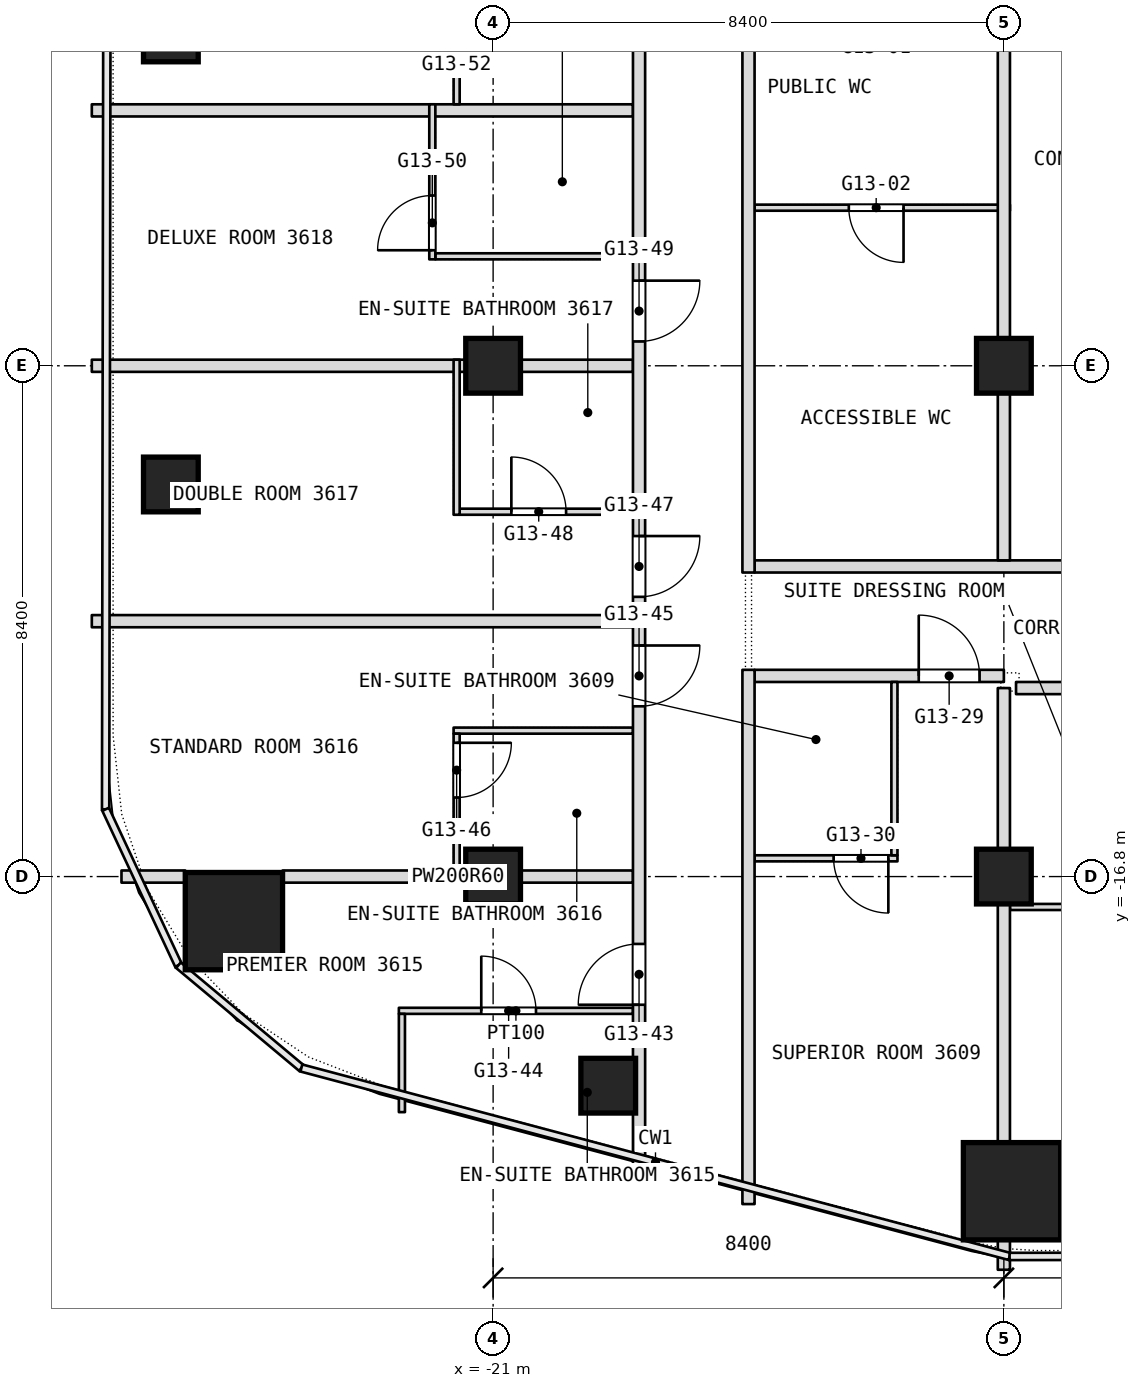
"""IFC4 building model, lengths in metres.
Left out: names, types, materials, properties, quantities, classifications, styles, units other than length and angle.
Written with IfcOpenShell. Run it as: python <this file> out.ifc"""

import sys

from ifc_helpers import new_model, si_unit, direction, frame, frame_2d, origin, origin_2d, place, context, subcontext, project, spatial, rectangle, extrude, element, fill, save


model = new_model("IFC4")
c1 = context("Model", 3, precision=1e-05, world=origin(), true_north=direction((0.0, 1.0)))
c2 = subcontext(c1, "Body", "Model", "MODEL_VIEW")
j1 = project(units=[si_unit("LENGTHUNIT", "METRE"), si_unit("PLANEANGLEUNIT", "RADIAN")], contexts=[c1])
p1 = place(None, origin())
s1 = spatial("IfcSite", under=j1, at=p1, CompositionType="ELEMENT")
p2 = place(p1, origin())
s2 = spatial("IfcBuilding", under=s1, at=p2, CompositionType="ELEMENT")
p3 = place(p2, frame((0.0, 0.0, 155.3)))
s3 = spatial("IfcBuildingStorey", under=s2, at=p3, CompositionType="ELEMENT", Elevation=155.3)
for number, where, z_axis, x_axis in (
    (1, (-25.263, -17.533, 0.0), (0.0, 0.0, 1.0), (1.0, 0.0, 0.0)),
    (2, (-12.466, -21.975, 0.0), (0.0, 0.0, 1.0), (1.0, 0.0, 0.0)),
):
    element("IfcColumn", number, at=place(p3, frame(where, z_axis=z_axis, x_axis=x_axis)), inside=s3, PredefinedType="COLUMN", context=c2, shape_type="SweptSolid", body=[
        extrude(rectangle(XDim=1.6, YDim=1.6, at=origin_2d()), origin(), (0.0, 0.0, 1.0), 3.6),
    ])
for number, where, z_axis, x_axis in (
    (3, (-21.0, -16.8, 0.0), (0.0, 0.0, 1.0), (1.0, 0.0, 0.0)),
    (4, (-21.0, -8.4, 0.0), (0.0, 0.0, 1.0), (1.0, 0.0, 0.0)),
    (5, (-12.6, -16.8, 0.0), (0.0, 0.0, 1.0), (1.0, 0.0, 0.0)),
    (6, (-12.6, -8.4, 0.0), (0.0, 0.0, 1.0), (1.0, 0.0, 0.0)),
    (7, (-26.3, -10.352, 0.0), (0.0, 0.0, 1.0), (1.0, 0.0, 0.0)),
    (8, (-26.3, -2.951, 0.0), (0.0, 0.0, 1.0), (1.0, 0.0, 0.0)),
    (9, (-19.107, -20.239, 0.0), (0.0, 0.0, 1.0), (1.0, 0.0, 0.0)),
):
    element("IfcColumn", number, at=place(p3, frame(where, z_axis=z_axis, x_axis=x_axis)), inside=s3, PredefinedType="COLUMN", context=c2, shape_type="SweptSolid", body=[
        extrude(rectangle(XDim=0.9, YDim=0.9, at=origin_2d()), origin(), (0.0, 0.0, 1.0), 3.6),
    ])
p4 = place(p3, frame((-22.55, -19.008, 0.0), z_axis=(0.0, 0.0, 1.0), x_axis=(1.0, 0.0, 0.0)))
e10 = element("IfcWall", 10, at=p4, inside=s3, PredefinedType="PARTITIONING", context=c2, shape_type="SweptSolid", body=[
    extrude(rectangle(XDim=3.85, YDim=0.1, at=frame_2d((1.925, 0.0))), origin(), (0.0, 0.0, 1.0), 3.34),
])
p5 = place(p4, frame((1.355, 0.0, 0.0)))
e11 = element("IfcOpeningElement", 11, at=p5, cuts=e10, PredefinedType="OPENING", context=c2, shape_type="SweptSolid", body=[
    extrude(rectangle(XDim=0.9, YDim=2.1, at=frame_2d((0.45, 1.05))), frame((0.0, 0.05, 0.0), z_axis=(0.0, -1.0, 0.0), x_axis=(1.0, 0.0, 0.0)), (0.0, 0.0, 1.0), 0.1),
])
p6 = place(p3, frame((-12.5, -17.3, 0.0), z_axis=(0.0, 0.0, 1.0), x_axis=(1.0, 0.0, 0.0)))
e12 = element("IfcWall", 12, at=p6, inside=s3, PredefinedType="PARTITIONING", context=c2, shape_type="SweptSolid", body=[
    extrude(rectangle(XDim=2.35, YDim=0.1, at=frame_2d((1.175, 0.0))), origin(), (0.0, 0.0, 1.0), 3.34),
])
p7 = place(p6, frame((1.3, 0.0, 0.0)))
e13 = element("IfcOpeningElement", 13, at=p7, cuts=e12, PredefinedType="OPENING", context=c2, shape_type="SweptSolid", body=[
    extrude(rectangle(XDim=0.9, YDim=2.1, at=frame_2d((0.45, 1.05))), frame((0.0, 0.05, 0.0), z_axis=(0.0, -1.0, 0.0), x_axis=(1.0, 0.0, 0.0)), (0.0, 0.0, 1.0), 0.1),
])
p8 = place(p3, frame((-27.112, -16.8, 0.0), z_axis=(0.0, 0.0, 1.0), x_axis=(1.0, 0.0, 0.0)))
e14 = element("IfcWall", 14, at=p8, inside=s3, PredefinedType="PARTITIONING", context=c2, shape_type="SweptSolid", body=[
    extrude(rectangle(XDim=1.049, YDim=0.2, at=frame_2d((0.524, 0.0))), origin(), (0.0, 0.0, 1.0), 3.34),
])
p9 = place(p3, frame((-24.463, -16.8, 0.0), z_axis=(0.0, 0.0, 1.0), x_axis=(1.0, 0.0, 0.0)))
e15 = element("IfcWall", 15, at=p9, inside=s3, PredefinedType="PARTITIONING", context=c2, shape_type="SweptSolid", body=[
    extrude(rectangle(XDim=5.763, YDim=0.2, at=frame_2d((2.881, 0.0))), origin(), (0.0, 0.0, 1.0), 2.89),
])
p10 = place(p3, frame((-16.7, -16.5, 0.0), z_axis=(0.0, 0.0, 1.0), x_axis=(1.0, 0.0, 0.0)))
e16 = element("IfcWall", 16, at=p10, inside=s3, PredefinedType="PARTITIONING", context=c2, shape_type="SweptSolid", body=[
    extrude(rectangle(XDim=2.35, YDim=0.1, at=frame_2d((1.175, 0.0))), origin(), (0.0, 0.0, 1.0), 3.34),
])
p11 = place(p10, frame((1.3, 0.0, 0.0)))
e17 = element("IfcOpeningElement", 17, at=p11, cuts=e16, PredefinedType="OPENING", context=c2, shape_type="SweptSolid", body=[
    extrude(rectangle(XDim=0.9, YDim=2.1, at=frame_2d((0.45, 1.05))), frame((0.0, 0.05, 0.0), z_axis=(0.0, -1.0, 0.0), x_axis=(1.0, 0.0, 0.0)), (0.0, 0.0, 1.0), 0.1),
])
p12 = place(p3, frame((-21.65, -14.4, 0.0), z_axis=(0.0, 0.0, 1.0), x_axis=(1.0, 0.0, 0.0)))
e18 = element("IfcWall", 18, at=p12, inside=s3, PredefinedType="PARTITIONING", context=c2, shape_type="SweptSolid", body=[
    extrude(rectangle(XDim=2.95, YDim=0.1, at=frame_2d((1.475, 0.0))), origin(), (0.0, 0.0, 1.0), 3.34),
])
p13 = place(p3, frame((-12.4, -13.7, 0.0), z_axis=(0.0, 0.0, 1.0), x_axis=(1.0, 0.0, 0.0)))
e19 = element("IfcWall", 19, at=p13, inside=s3, PredefinedType="PARTITIONING", context=c2, shape_type="SweptSolid", body=[
    extrude(rectangle(XDim=9.2, YDim=0.2, at=frame_2d((4.6, 0.0))), origin(), (0.0, 0.0, 1.0), 3.34),
])
p14 = place(p13, frame((3.4, 0.0, 0.0)))
e20 = element("IfcOpeningElement", 20, at=p14, cuts=e19, PredefinedType="OPENING", context=c2, shape_type="SweptSolid", body=[
    extrude(rectangle(XDim=1.1, YDim=2.1, at=frame_2d((0.55, 1.05))), frame((0.0, 0.1, 0.0), z_axis=(0.0, -1.0, 0.0), x_axis=(1.0, 0.0, 0.0)), (0.0, 0.0, 1.0), 0.2),
])
p15 = place(p3, frame((-16.7, -13.5, 0.0), z_axis=(0.0, 0.0, 1.0), x_axis=(1.0, 0.0, 0.0)))
e21 = element("IfcWall", 21, at=p15, inside=s3, PredefinedType="PARTITIONING", context=c2, shape_type="SweptSolid", body=[
    extrude(rectangle(XDim=4.1, YDim=0.2, at=frame_2d((2.05, 0.0))), origin(), (0.0, 0.0, 1.0), 3.34),
])
p16 = place(p15, frame((2.7, 0.0, 0.0)))
e22 = element("IfcOpeningElement", 22, at=p16, cuts=e21, PredefinedType="OPENING", context=c2, shape_type="SweptSolid", body=[
    extrude(rectangle(XDim=1.0, YDim=2.1, at=frame_2d((0.5, 1.05))), frame((0.0, 0.1, 0.0), z_axis=(0.0, -1.0, 0.0), x_axis=(1.0, 0.0, 0.0)), (0.0, 0.0, 1.0), 0.2),
])
p17 = place(p3, frame((-27.6, -12.6, 0.0), z_axis=(0.0, 0.0, 1.0), x_axis=(1.0, 0.0, 0.0)))
e23 = element("IfcWall", 23, at=p17, inside=s3, PredefinedType="PARTITIONING", context=c2, shape_type="SweptSolid", body=[
    extrude(rectangle(XDim=8.9, YDim=0.2, at=frame_2d((4.45, 0.0))), origin(), (0.0, 0.0, 1.0), 3.34),
])
p18 = place(p3, frame((-16.7, -11.7, 0.0), z_axis=(0.0, 0.0, 1.0), x_axis=(1.0, 0.0, 0.0)))
e24 = element("IfcWall", 24, at=p18, inside=s3, PredefinedType="PARTITIONING", context=c2, shape_type="SweptSolid", body=[
    extrude(rectangle(XDim=5.8, YDim=0.2, at=frame_2d((2.9, 0.0))), origin(), (0.0, 0.0, 1.0), 3.34),
])
p19 = place(p3, frame((-21.55, -10.8, 0.0), z_axis=(0.0, 0.0, 1.0), x_axis=(1.0, 0.0, 0.0)))
e25 = element("IfcWall", 25, at=p19, inside=s3, PredefinedType="PARTITIONING", context=c2, shape_type="SweptSolid", body=[
    extrude(rectangle(XDim=2.85, YDim=0.1, at=frame_2d((1.425, 0.0))), origin(), (0.0, 0.0, 1.0), 3.34),
])
p20 = place(p19, frame((0.85, 0.0, 0.0)))
e26 = element("IfcOpeningElement", 26, at=p20, cuts=e25, PredefinedType="OPENING", context=c2, shape_type="SweptSolid", body=[
    extrude(rectangle(XDim=0.9, YDim=2.1, at=frame_2d((0.45, 1.05))), frame((0.0, 0.05, 0.0), z_axis=(0.0, -1.0, 0.0), x_axis=(1.0, 0.0, 0.0)), (0.0, 0.0, 1.0), 0.1),
])
p21 = place(p3, frame((-27.6, -8.4, 0.0), z_axis=(0.0, 0.0, 1.0), x_axis=(1.0, 0.0, 0.0)))
e27 = element("IfcWall", 27, at=p21, inside=s3, PredefinedType="PARTITIONING", context=c2, shape_type="SweptSolid", body=[
    extrude(rectangle(XDim=8.9, YDim=0.2, at=frame_2d((4.45, 0.0))), origin(), (0.0, 0.0, 1.0), 2.89),
])
p22 = place(p3, frame((-21.95, -6.6, 0.0), z_axis=(0.0, 0.0, 1.0), x_axis=(1.0, 0.0, 0.0)))
e28 = element("IfcWall", 28, at=p22, inside=s3, PredefinedType="PARTITIONING", context=c2, shape_type="SweptSolid", body=[
    extrude(rectangle(XDim=3.25, YDim=0.1, at=frame_2d((1.625, 0.0))), origin(), (0.0, 0.0, 1.0), 3.34),
])
p23 = place(p3, frame((-16.7, -5.8, 0.0), z_axis=(0.0, 0.0, 1.0), x_axis=(1.0, 0.0, 0.0)))
e29 = element("IfcWall", 29, at=p23, inside=s3, PredefinedType="PARTITIONING", context=c2, shape_type="SweptSolid", body=[
    extrude(rectangle(XDim=4.2, YDim=0.1, at=frame_2d((2.1, 0.0))), origin(), (0.0, 0.0, 1.0), 3.34),
])
p24 = place(p23, frame((1.55, 0.0, 0.0)))
e30 = element("IfcOpeningElement", 30, at=p24, cuts=e29, PredefinedType="OPENING", context=c2, shape_type="SweptSolid", body=[
    extrude(rectangle(XDim=0.9, YDim=2.1, at=frame_2d((0.45, 1.05))), frame((0.0, 0.05, 0.0), z_axis=(0.0, -1.0, 0.0), x_axis=(1.0, 0.0, 0.0)), (0.0, 0.0, 1.0), 0.1),
])
p25 = place(p3, frame((-27.6, -4.2, 0.0), z_axis=(0.0, 0.0, 1.0), x_axis=(1.0, 0.0, 0.0)))
e31 = element("IfcWall", 31, at=p25, inside=s3, PredefinedType="PARTITIONING", context=c2, shape_type="SweptSolid", body=[
    extrude(rectangle(XDim=8.9, YDim=0.2, at=frame_2d((4.45, 0.0))), origin(), (0.0, 0.0, 1.0), 3.34),
])
p26 = place(p3, frame((-12.6, -23.266, 0.0), z_axis=(0.0, 0.0, 1.0), x_axis=(0.0, 1.0, 0.0)))
e32 = element("IfcWall", 32, at=p26, inside=s3, PredefinedType="PARTITIONING", context=c2, shape_type="SweptSolid", body=[
    extrude(rectangle(XDim=0.491, YDim=0.2, at=frame_2d((0.246, 0.0))), origin(), (0.0, 0.0, 1.0), 3.34),
])
p27 = place(p3, frame((-12.6, -21.175, 0.0), z_axis=(0.0, 0.0, 1.0), x_axis=(0.0, 1.0, 0.0)))
e33 = element("IfcWall", 33, at=p27, inside=s3, PredefinedType="PARTITIONING", context=c2, shape_type="SweptSolid", body=[
    extrude(rectangle(XDim=7.475, YDim=0.2, at=frame_2d((3.738, 0.0))), origin(), (0.0, 0.0, 1.0), 3.34),
])
p28 = place(p3, frame((-12.6, -11.6, 0.0), z_axis=(0.0, 0.0, 1.0), x_axis=(0.0, 1.0, 0.0)))
e34 = element("IfcWall", 34, at=p28, inside=s3, PredefinedType="PARTITIONING", context=c2, shape_type="SweptSolid", body=[
    extrude(rectangle(XDim=9.7, YDim=0.2, at=frame_2d((4.85, 0.0))), origin(), (0.0, 0.0, 1.0), 3.34),
])
p29 = place(p3, frame((-14.4, -16.45, 0.0), z_axis=(0.0, 0.0, 1.0), x_axis=(0.0, 1.0, 0.0)))
e35 = element("IfcWall", 35, at=p29, inside=s3, PredefinedType="PARTITIONING", context=c2, shape_type="SweptSolid", body=[
    extrude(rectangle(XDim=2.85, YDim=0.1, at=frame_2d((1.425, 0.0))), origin(), (0.0, 0.0, 1.0), 3.34),
])
p30 = place(p3, frame((-16.8, -22.186, 0.0), z_axis=(0.0, 0.0, 1.0), x_axis=(0.0, 1.0, 0.0)))
e36 = element("IfcWall", 36, at=p30, inside=s3, PredefinedType="PARTITIONING", context=c2, shape_type="SweptSolid", body=[
    extrude(rectangle(XDim=8.786, YDim=0.2, at=frame_2d((4.393, 0.0))), origin(), (0.0, 0.0, 1.0), 3.34),
])
p31 = place(p3, frame((-16.8, -11.8, 0.0), z_axis=(0.0, 0.0, 1.0), x_axis=(0.0, 1.0, 0.0)))
e37 = element("IfcWall", 37, at=p31, inside=s3, PredefinedType="PARTITIONING", context=c2, shape_type="SweptSolid", body=[
    extrude(rectangle(XDim=9.9, YDim=0.2, at=frame_2d((4.95, 0.0))), origin(), (0.0, 0.0, 1.0), 3.34),
])
p32 = place(p3, frame((-18.6, -21.708, 0.0), z_axis=(0.0, 0.0, 1.0), x_axis=(0.0, 1.0, 0.0)))
e38 = element("IfcWall", 38, at=p32, inside=s3, PredefinedType="PARTITIONING", context=c2, shape_type="SweptSolid", body=[
    extrude(rectangle(XDim=28.608, YDim=0.2, at=frame_2d((14.304, 0.0))), origin(), (0.0, 0.0, 1.0), 3.34),
])
p33 = place(p32, frame((2.8, 0.0, 0.0)))
e39 = element("IfcOpeningElement", 39, at=p33, cuts=e38, PredefinedType="OPENING", context=c2, shape_type="SweptSolid", body=[
    extrude(rectangle(XDim=1.0, YDim=2.1, at=frame_2d((0.5, 1.05))), frame((0.0, 0.1, 0.0), z_axis=(0.0, -1.0, 0.0), x_axis=(1.0, 0.0, 0.0)), (0.0, 0.0, 1.0), 0.2),
])
p34 = place(p32, frame((7.708, 0.0, 0.0)))
e40 = element("IfcOpeningElement", 40, at=p34, cuts=e38, PredefinedType="OPENING", context=c2, shape_type="SweptSolid", body=[
    extrude(rectangle(XDim=1.0, YDim=2.1, at=frame_2d((0.5, 1.05))), frame((0.0, 0.1, 0.0), z_axis=(0.0, -1.0, 0.0), x_axis=(1.0, 0.0, 0.0)), (0.0, 0.0, 1.0), 0.2),
])
p35 = place(p32, frame((9.508, 0.0, 0.0)))
e41 = element("IfcOpeningElement", 41, at=p35, cuts=e38, PredefinedType="OPENING", context=c2, shape_type="SweptSolid", body=[
    extrude(rectangle(XDim=1.0, YDim=2.1, at=frame_2d((0.5, 1.05))), frame((0.0, 0.1, 0.0), z_axis=(0.0, -1.0, 0.0), x_axis=(1.0, 0.0, 0.0)), (0.0, 0.0, 1.0), 0.2),
])
p36 = place(p32, frame((13.708, 0.0, 0.0)))
e42 = element("IfcOpeningElement", 42, at=p36, cuts=e38, PredefinedType="OPENING", context=c2, shape_type="SweptSolid", body=[
    extrude(rectangle(XDim=1.0, YDim=2.1, at=frame_2d((0.5, 1.05))), frame((0.0, 0.1, 0.0), z_axis=(0.0, -1.0, 0.0), x_axis=(1.0, 0.0, 0.0)), (0.0, 0.0, 1.0), 0.2),
])
p37 = place(p32, frame((20.308, 0.0, 0.0)))
e43 = element("IfcOpeningElement", 43, at=p37, cuts=e38, PredefinedType="OPENING", context=c2, shape_type="SweptSolid", body=[
    extrude(rectangle(XDim=1.0, YDim=2.1, at=frame_2d((0.5, 1.05))), frame((0.0, 0.1, 0.0), z_axis=(0.0, -1.0, 0.0), x_axis=(1.0, 0.0, 0.0)), (0.0, 0.0, 1.0), 0.2),
])
p38 = place(p3, frame((-21.6, -16.7, 0.0), z_axis=(0.0, 0.0, 1.0), x_axis=(0.0, 1.0, 0.0)))
e44 = element("IfcWall", 44, at=p38, inside=s3, PredefinedType="PARTITIONING", context=c2, shape_type="SweptSolid", body=[
    extrude(rectangle(XDim=2.25, YDim=0.1, at=frame_2d((1.125, 0.0))), origin(), (0.0, 0.0, 1.0), 3.34),
])
p39 = place(p38, frame((1.2, 0.0, 0.0)))
e45 = element("IfcOpeningElement", 45, at=p39, cuts=e44, PredefinedType="OPENING", context=c2, shape_type="SweptSolid", body=[
    extrude(rectangle(XDim=0.9, YDim=2.1, at=frame_2d((0.45, 1.05))), frame((0.0, 0.05, 0.0), z_axis=(0.0, -1.0, 0.0), x_axis=(1.0, 0.0, 0.0)), (0.0, 0.0, 1.0), 0.1),
])
p40 = place(p3, frame((-21.6, -10.85, 0.0), z_axis=(0.0, 0.0, 1.0), x_axis=(0.0, 1.0, 0.0)))
e46 = element("IfcWall", 46, at=p40, inside=s3, PredefinedType="PARTITIONING", context=c2, shape_type="SweptSolid", body=[
    extrude(rectangle(XDim=2.55, YDim=0.1, at=frame_2d((1.275, 0.0))), origin(), (0.0, 0.0, 1.0), 3.34),
])
p41 = place(p3, frame((-21.6, -4.1, 0.0), z_axis=(0.0, 0.0, 1.0), x_axis=(0.0, 1.0, 0.0)))
e47 = element("IfcWall", 47, at=p41, inside=s3, PredefinedType="PARTITIONING", context=c2, shape_type="SweptSolid", body=[
    extrude(rectangle(XDim=2.25, YDim=0.1, at=frame_2d((1.125, 0.0))), origin(), (0.0, 0.0, 1.0), 3.34),
])
p42 = place(p41, frame((1.2, 0.0, 0.0)))
e48 = element("IfcOpeningElement", 48, at=p42, cuts=e47, PredefinedType="OPENING", context=c2, shape_type="SweptSolid", body=[
    extrude(rectangle(XDim=0.9, YDim=2.1, at=frame_2d((0.45, 1.05))), frame((0.0, 0.05, 0.0), z_axis=(0.0, -1.0, 0.0), x_axis=(1.0, 0.0, 0.0)), (0.0, 0.0, 1.0), 0.1),
])
p43 = place(p3, frame((-22.0, -6.65, 0.0), z_axis=(0.0, 0.0, 1.0), x_axis=(0.0, 1.0, 0.0)))
e49 = element("IfcWall", 49, at=p43, inside=s3, PredefinedType="PARTITIONING", context=c2, shape_type="SweptSolid", body=[
    extrude(rectangle(XDim=2.55, YDim=0.1, at=frame_2d((1.275, 0.0))), origin(), (0.0, 0.0, 1.0), 3.34),
])
p44 = place(p43, frame((0.15, 0.0, 0.0)))
e50 = element("IfcOpeningElement", 50, at=p44, cuts=e49, PredefinedType="OPENING", context=c2, shape_type="SweptSolid", body=[
    extrude(rectangle(XDim=0.9, YDim=2.1, at=frame_2d((0.45, 1.05))), frame((0.0, 0.05, 0.0), z_axis=(0.0, -1.0, 0.0), x_axis=(1.0, 0.0, 0.0)), (0.0, 0.0, 1.0), 0.1),
])
p45 = place(p3, frame((-22.5, -20.674, 0.0), z_axis=(0.0, 0.0, 1.0), x_axis=(0.0, 1.0, 0.0)))
e51 = element("IfcWall", 51, at=p45, inside=s3, PredefinedType="PARTITIONING", context=c2, shape_type="SweptSolid", body=[
    extrude(rectangle(XDim=1.616, YDim=0.1, at=frame_2d((0.808, 0.0))), origin(), (0.0, 0.0, 1.0), 3.34),
])
p46 = place(p5, origin())
e52 = element("IfcDoor", 52, at=p46, inside=s3, OperationType="SINGLE_SWING_LEFT", PredefinedType="DOOR", context=c2, shape_type="SweptSolid", body=[
    extrude(rectangle(XDim=0.9, YDim=2.1, at=frame_2d((0.45, 1.05))), frame((0.0, 0.025, 0.0), z_axis=(0.0, -1.0, 0.0), x_axis=(1.0, 0.0, 0.0)), (0.0, 0.0, 1.0), 0.05),
])
fill(e11, e52)
p47 = place(p11, origin())
e53 = element("IfcDoor", 53, at=p47, inside=s3, OperationType="SINGLE_SWING_RIGHT", PredefinedType="DOOR", context=c2, shape_type="SweptSolid", body=[
    extrude(rectangle(XDim=0.9, YDim=2.1, at=frame_2d((0.45, 1.05))), frame((0.0, 0.025, 0.0), z_axis=(0.0, -1.0, 0.0), x_axis=(1.0, 0.0, 0.0)), (0.0, 0.0, 1.0), 0.05),
])
fill(e17, e53)
p48 = place(p16, origin())
e54 = element("IfcDoor", 54, at=p48, inside=s3, OperationType="SINGLE_SWING_LEFT", PredefinedType="DOOR", context=c2, shape_type="SweptSolid", body=[
    extrude(rectangle(XDim=1.0, YDim=2.1, at=frame_2d((0.5, 1.05))), frame((0.0, 0.025, 0.0), z_axis=(0.0, -1.0, 0.0), x_axis=(1.0, 0.0, 0.0)), (0.0, 0.0, 1.0), 0.05),
])
fill(e22, e54)
p49 = place(p20, origin())
e55 = element("IfcDoor", 55, at=p49, inside=s3, OperationType="SINGLE_SWING_LEFT", PredefinedType="DOOR", context=c2, shape_type="SweptSolid", body=[
    extrude(rectangle(XDim=0.9, YDim=2.1, at=frame_2d((0.45, 1.05))), frame((0.0, 0.025, 0.0), z_axis=(0.0, -1.0, 0.0), x_axis=(1.0, 0.0, 0.0)), (0.0, 0.0, 1.0), 0.05),
])
fill(e26, e55)
p50 = place(p24, origin())
e56 = element("IfcDoor", 56, at=p50, inside=s3, OperationType="SINGLE_SWING_RIGHT", PredefinedType="DOOR", context=c2, shape_type="SweptSolid", body=[
    extrude(rectangle(XDim=0.9, YDim=2.1, at=frame_2d((0.45, 1.05))), frame((0.0, 0.025, 0.0), z_axis=(0.0, -1.0, 0.0), x_axis=(1.0, 0.0, 0.0)), (0.0, 0.0, 1.0), 0.05),
])
fill(e30, e56)
p51 = place(p33, origin())
e57 = element("IfcDoor", 57, at=p51, inside=s3, OperationType="SINGLE_SWING_LEFT", PredefinedType="DOOR", context=c2, shape_type="SweptSolid", body=[
    extrude(rectangle(XDim=1.0, YDim=2.1, at=frame_2d((0.5, 1.05))), frame((0.0, 0.025, 0.0), z_axis=(0.0, -1.0, 0.0), x_axis=(1.0, 0.0, 0.0)), (0.0, 0.0, 1.0), 0.05),
])
fill(e39, e57)
p52 = place(p34, origin())
e58 = element("IfcDoor", 58, at=p52, inside=s3, OperationType="SINGLE_SWING_RIGHT", PredefinedType="DOOR", context=c2, shape_type="SweptSolid", body=[
    extrude(rectangle(XDim=1.0, YDim=2.1, at=frame_2d((0.5, 1.05))), frame((0.0, 0.025, 0.0), z_axis=(0.0, -1.0, 0.0), x_axis=(1.0, 0.0, 0.0)), (0.0, 0.0, 1.0), 0.05),
])
fill(e40, e58)
p53 = place(p35, origin())
e59 = element("IfcDoor", 59, at=p53, inside=s3, OperationType="SINGLE_SWING_RIGHT", PredefinedType="DOOR", context=c2, shape_type="SweptSolid", body=[
    extrude(rectangle(XDim=1.0, YDim=2.1, at=frame_2d((0.5, 1.05))), frame((0.0, 0.025, 0.0), z_axis=(0.0, -1.0, 0.0), x_axis=(1.0, 0.0, 0.0)), (0.0, 0.0, 1.0), 0.05),
])
fill(e41, e59)
p54 = place(p36, origin())
e60 = element("IfcDoor", 60, at=p54, inside=s3, OperationType="SINGLE_SWING_RIGHT", PredefinedType="DOOR", context=c2, shape_type="SweptSolid", body=[
    extrude(rectangle(XDim=1.0, YDim=2.1, at=frame_2d((0.5, 1.05))), frame((0.0, 0.025, 0.0), z_axis=(0.0, -1.0, 0.0), x_axis=(1.0, 0.0, 0.0)), (0.0, 0.0, 1.0), 0.05),
])
fill(e42, e60)
p55 = place(p39, origin())
e61 = element("IfcDoor", 61, at=p55, inside=s3, OperationType="SINGLE_SWING_LEFT", PredefinedType="DOOR", context=c2, shape_type="SweptSolid", body=[
    extrude(rectangle(XDim=0.9, YDim=2.1, at=frame_2d((0.45, 1.05))), frame((0.0, 0.025, 0.0), z_axis=(0.0, -1.0, 0.0), x_axis=(1.0, 0.0, 0.0)), (0.0, 0.0, 1.0), 0.05),
])
fill(e45, e61)
p56 = place(p44, origin())
e62 = element("IfcDoor", 62, at=p56, inside=s3, OperationType="SINGLE_SWING_RIGHT", PredefinedType="DOOR", context=c2, shape_type="SweptSolid", body=[
    extrude(rectangle(XDim=0.9, YDim=2.1, at=frame_2d((0.45, 1.05))), frame((0.0, 0.025, 0.0), z_axis=(0.0, -1.0, 0.0), x_axis=(1.0, 0.0, 0.0)), (0.0, 0.0, 1.0), 0.05),
])
fill(e50, e62)
save(model, sys.argv[1])
